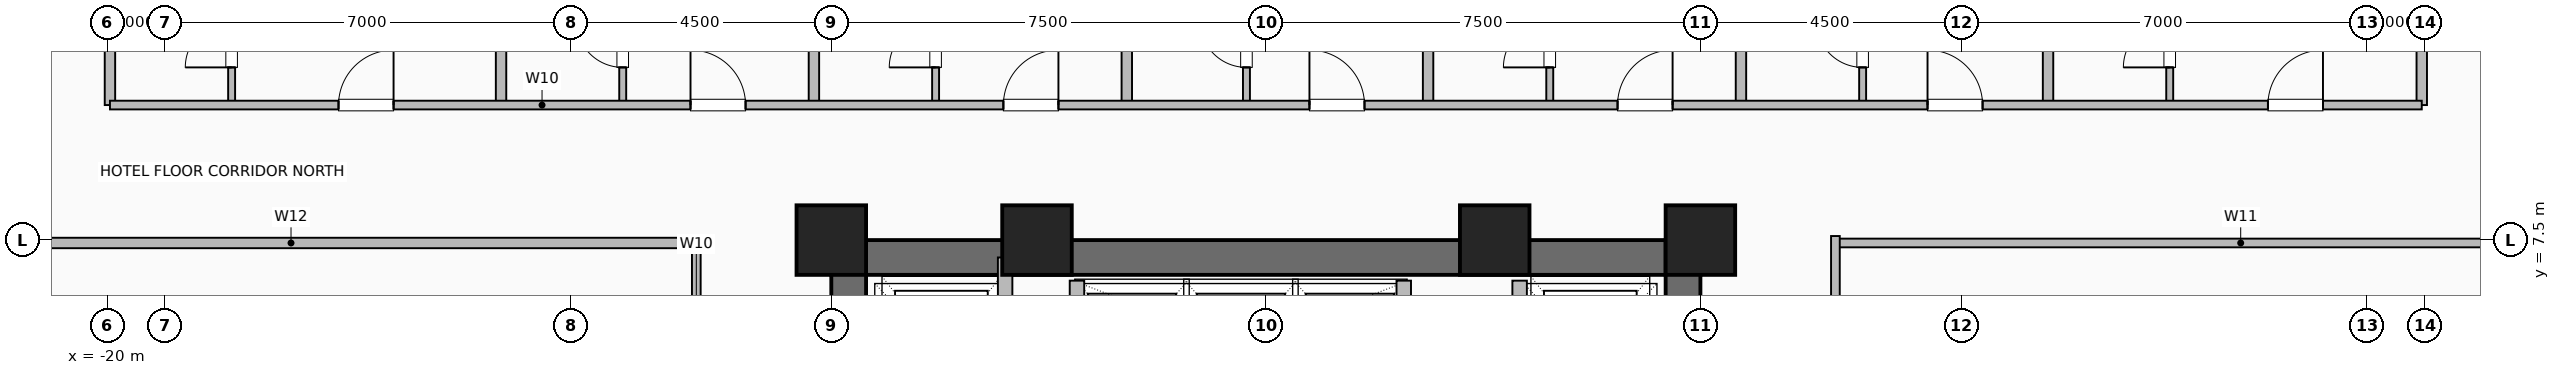
"""IFC4 building model, lengths in metres.
Left out: names, types, materials, properties, quantities, classifications, styles, units other than length and angle.
Written with IfcOpenShell. Run it as: python <this file> out.ifc"""

import sys

from ifc_helpers import new_model, si_unit, direction, frame, frame_2d, origin, origin_2d, place, context, subcontext, project, spatial, rectangle, hollow_rectangle, extrude, element, fill, save


model = new_model("IFC4")
c1 = context("Model", 3, precision=1e-05, world=origin(), true_north=direction((0.0, 1.0)))
c2 = subcontext(c1, "Body", "Model", "MODEL_VIEW")
j1 = project(units=[si_unit("LENGTHUNIT", "METRE"), si_unit("PLANEANGLEUNIT", "RADIAN")], contexts=[c1])
p1 = place(None, origin())
s1 = spatial("IfcSite", under=j1, at=p1, CompositionType="ELEMENT")
p2 = place(p1, origin())
s2 = spatial("IfcBuilding", under=s1, at=p2, CompositionType="ELEMENT")
p3 = place(p2, frame((0.0, 0.0, 34.0)))
s3 = spatial("IfcBuildingStorey", under=s2, at=p3, CompositionType="ELEMENT", Elevation=34.0)
for number, where, z_axis, x_axis in (
    (1, (7.5, 7.5, 0.0), (0.0, 0.0, 1.0), (1.0, 0.0, 0.0)),
    (2, (3.95, 7.5, 0.0), (0.0, 0.0, 1.0), (1.0, 0.0, 0.0)),
    (3, (-3.95, 7.5, 0.0), (0.0, 0.0, 1.0), (1.0, 0.0, 0.0)),
    (4, (-7.5, 7.5, 0.0), (0.0, 0.0, 1.0), (1.0, 0.0, 0.0)),
):
    element("IfcColumn", number, at=place(p3, frame(where, z_axis=z_axis, x_axis=x_axis)), inside=s3, PredefinedType="COLUMN", context=c2, shape_type="SweptSolid", body=[
        extrude(hollow_rectangle(XDim=1.2, YDim=1.2, WallThickness=0.055, at=origin_2d()), origin(), (0.0, 0.0, 1.0), 3.5),
    ])
p4 = place(p3, frame((-7.5, 7.2, 0.0), z_axis=(0.0, 0.0, 1.0), x_axis=(1.0, 0.0, 0.0)))
e5 = element("IfcWall", 5, at=p4, inside=s3, PredefinedType="SHEAR", context=c2, shape_type="SweptSolid", body=[
    extrude(rectangle(XDim=15.0, YDim=0.6, at=frame_2d((7.5, 0.0))), origin(), (0.0, 0.0, 1.0), 3.25),
])
p5 = place(p3, frame((-7.2, -7.5, 0.0), z_axis=(0.0, 0.0, 1.0), x_axis=(0.0, 1.0, 0.0)))
e6 = element("IfcWall", 6, at=p5, inside=s3, PredefinedType="SHEAR", context=c2, shape_type="SweptSolid", body=[
    extrude(rectangle(XDim=15.0, YDim=0.6, at=frame_2d((7.5, 0.0))), origin(), (0.0, 0.0, 1.0), 3.25),
])
p6 = place(p5, frame((9.5, 0.0, 0.0)))
e7 = element("IfcOpeningElement", 7, at=p6, cuts=e6, PredefinedType="OPENING", context=c2, shape_type="SweptSolid", body=[
    extrude(rectangle(XDim=1.0, YDim=2.08, at=frame_2d((0.5, 1.04))), frame((0.0, 0.31, 0.0), z_axis=(0.0, -1.0, 0.0), x_axis=(1.0, 0.0, 0.0)), (0.0, 0.0, 1.0), 0.62),
])
p7 = place(p3, frame((7.2, -7.5, 0.0), z_axis=(0.0, 0.0, 1.0), x_axis=(0.0, 1.0, 0.0)))
e8 = element("IfcWall", 8, at=p7, inside=s3, PredefinedType="SHEAR", context=c2, shape_type="SweptSolid", body=[
    extrude(rectangle(XDim=15.0, YDim=0.6, at=frame_2d((7.5, 0.0))), origin(), (0.0, 0.0, 1.0), 3.25),
])
for number, where, z_axis, x_axis in (
    (9, (-3.26, 4.58, 0.0), (0.0, 0.0, 1.0), (0.0, 1.0, 0.0)),
    (10, (2.38, 4.58, 0.0), (0.0, 0.0, 1.0), (0.0, 1.0, 0.0)),
):
    element("IfcWall", number, at=place(p3, frame(where, z_axis=z_axis, x_axis=x_axis)), inside=s3, PredefinedType="SHEAR", context=c2, shape_type="SweptSolid", body=[
        extrude(rectangle(XDim=2.22, YDim=0.25, at=frame_2d((1.11, 0.0))), origin(), (0.0, 0.0, 1.0), 3.25),
    ])
p8 = place(p3, frame((-4.5, 4.35, 0.0), z_axis=(0.0, 0.0, 1.0), x_axis=(0.0, 1.0, 0.0)))
e11 = element("IfcWall", 11, at=p8, inside=s3, PredefinedType="SHEAR", context=c2, shape_type="SweptSolid", body=[
    extrude(rectangle(XDim=2.85, YDim=0.25, at=frame_2d((1.425, 0.0))), origin(), (0.0, 0.0, 1.0), 3.25),
])
p9 = place(p3, frame((4.38, 4.3, 0.0), z_axis=(0.0, 0.0, 1.0), x_axis=(0.0, 1.0, 0.0)))
e12 = element("IfcWall", 12, at=p9, inside=s3, PredefinedType="SHEAR", context=c2, shape_type="SweptSolid", body=[
    extrude(rectangle(XDim=2.5, YDim=0.25, at=frame_2d((1.25, 0.0))), origin(), (0.0, 0.0, 1.0), 3.25),
])
p10 = place(p9, frame((0.8, 0.0, 0.0)))
e13 = element("IfcOpeningElement", 13, at=p10, cuts=e12, PredefinedType="OPENING", context=c2, shape_type="SweptSolid", body=[
    extrude(rectangle(XDim=1.2, YDim=2.2, at=frame_2d((0.6, 1.1))), frame((0.0, 0.135, 0.0), z_axis=(0.0, -1.0, 0.0), x_axis=(1.0, 0.0, 0.0)), (0.0, 0.0, 1.0), 0.27),
])
p11 = place(p3, frame((-17.85, 9.83, 0.0), z_axis=(0.0, 0.0, 1.0), x_axis=(0.0, 1.0, 0.0)))
e14 = element("IfcWall", 14, at=p11, inside=s3, PredefinedType="PLUMBINGWALL", context=c2, shape_type="SweptSolid", body=[
    extrude(rectangle(XDim=2.25, YDim=0.12, at=frame_2d((1.125, 0.0))), origin(), (0.0, 0.0, 1.0), 3.25),
])
p12 = place(p11, frame((0.65, 0.0, 0.0)))
e15 = element("IfcOpeningElement", 15, at=p12, cuts=e14, PredefinedType="OPENING", context=c2, shape_type="SweptSolid", body=[
    extrude(rectangle(XDim=0.8, YDim=2.05, at=frame_2d((0.4, 1.025))), frame((0.0, 0.07, 0.0), z_axis=(0.0, -1.0, 0.0), x_axis=(1.0, 0.0, 0.0)), (0.0, 0.0, 1.0), 0.14),
])
p13 = place(p3, frame((-11.1, 9.83, 0.0), z_axis=(0.0, 0.0, 1.0), x_axis=(0.0, 1.0, 0.0)))
e16 = element("IfcWall", 16, at=p13, inside=s3, PredefinedType="PLUMBINGWALL", context=c2, shape_type="SweptSolid", body=[
    extrude(rectangle(XDim=2.25, YDim=0.12, at=frame_2d((1.125, 0.0))), origin(), (0.0, 0.0, 1.0), 3.25),
])
p14 = place(p13, frame((0.65, 0.0, 0.0)))
e17 = element("IfcOpeningElement", 17, at=p14, cuts=e16, PredefinedType="OPENING", context=c2, shape_type="SweptSolid", body=[
    extrude(rectangle(XDim=0.8, YDim=2.05, at=frame_2d((0.4, 1.025))), frame((0.0, 0.07, 0.0), z_axis=(0.0, -1.0, 0.0), x_axis=(1.0, 0.0, 0.0)), (0.0, 0.0, 1.0), 0.14),
])
p15 = place(p3, frame((-5.7, 9.83, 0.0), z_axis=(0.0, 0.0, 1.0), x_axis=(0.0, 1.0, 0.0)))
e18 = element("IfcWall", 18, at=p15, inside=s3, PredefinedType="PLUMBINGWALL", context=c2, shape_type="SweptSolid", body=[
    extrude(rectangle(XDim=2.25, YDim=0.12, at=frame_2d((1.125, 0.0))), origin(), (0.0, 0.0, 1.0), 3.25),
])
p16 = place(p15, frame((0.65, 0.0, 0.0)))
e19 = element("IfcOpeningElement", 19, at=p16, cuts=e18, PredefinedType="OPENING", context=c2, shape_type="SweptSolid", body=[
    extrude(rectangle(XDim=0.8, YDim=2.05, at=frame_2d((0.4, 1.025))), frame((0.0, 0.07, 0.0), z_axis=(0.0, -1.0, 0.0), x_axis=(1.0, 0.0, 0.0)), (0.0, 0.0, 1.0), 0.14),
])
p17 = place(p3, frame((-0.335, 9.83, 0.0), z_axis=(0.0, 0.0, 1.0), x_axis=(0.0, 1.0, 0.0)))
e20 = element("IfcWall", 20, at=p17, inside=s3, PredefinedType="PLUMBINGWALL", context=c2, shape_type="SweptSolid", body=[
    extrude(rectangle(XDim=2.25, YDim=0.12, at=frame_2d((1.125, 0.0))), origin(), (0.0, 0.0, 1.0), 3.25),
])
p18 = place(p17, frame((0.65, 0.0, 0.0)))
e21 = element("IfcOpeningElement", 21, at=p18, cuts=e20, PredefinedType="OPENING", context=c2, shape_type="SweptSolid", body=[
    extrude(rectangle(XDim=0.8, YDim=2.05, at=frame_2d((0.4, 1.025))), frame((0.0, 0.07, 0.0), z_axis=(0.0, -1.0, 0.0), x_axis=(1.0, 0.0, 0.0)), (0.0, 0.0, 1.0), 0.14),
])
p19 = place(p3, frame((4.9, 9.83, 0.0), z_axis=(0.0, 0.0, 1.0), x_axis=(0.0, 1.0, 0.0)))
e22 = element("IfcWall", 22, at=p19, inside=s3, PredefinedType="PLUMBINGWALL", context=c2, shape_type="SweptSolid", body=[
    extrude(rectangle(XDim=2.25, YDim=0.12, at=frame_2d((1.125, 0.0))), origin(), (0.0, 0.0, 1.0), 3.25),
])
p20 = place(p19, frame((0.65, 0.0, 0.0)))
e23 = element("IfcOpeningElement", 23, at=p20, cuts=e22, PredefinedType="OPENING", context=c2, shape_type="SweptSolid", body=[
    extrude(rectangle(XDim=0.8, YDim=2.05, at=frame_2d((0.4, 1.025))), frame((0.0, 0.07, 0.0), z_axis=(0.0, -1.0, 0.0), x_axis=(1.0, 0.0, 0.0)), (0.0, 0.0, 1.0), 0.14),
])
p21 = place(p3, frame((10.3, 9.83, 0.0), z_axis=(0.0, 0.0, 1.0), x_axis=(0.0, 1.0, 0.0)))
e24 = element("IfcWall", 24, at=p21, inside=s3, PredefinedType="PLUMBINGWALL", context=c2, shape_type="SweptSolid", body=[
    extrude(rectangle(XDim=2.25, YDim=0.12, at=frame_2d((1.125, 0.0))), origin(), (0.0, 0.0, 1.0), 3.25),
])
p22 = place(p21, frame((0.65, 0.0, 0.0)))
e25 = element("IfcOpeningElement", 25, at=p22, cuts=e24, PredefinedType="OPENING", context=c2, shape_type="SweptSolid", body=[
    extrude(rectangle(XDim=0.8, YDim=2.05, at=frame_2d((0.4, 1.025))), frame((0.0, 0.07, 0.0), z_axis=(0.0, -1.0, 0.0), x_axis=(1.0, 0.0, 0.0)), (0.0, 0.0, 1.0), 0.14),
])
p23 = place(p3, frame((15.6, 9.83, 0.0), z_axis=(0.0, 0.0, 1.0), x_axis=(0.0, 1.0, 0.0)))
e26 = element("IfcWall", 26, at=p23, inside=s3, PredefinedType="PLUMBINGWALL", context=c2, shape_type="SweptSolid", body=[
    extrude(rectangle(XDim=2.25, YDim=0.12, at=frame_2d((1.125, 0.0))), origin(), (0.0, 0.0, 1.0), 3.25),
])
p24 = place(p23, frame((0.65, 0.0, 0.0)))
e27 = element("IfcOpeningElement", 27, at=p24, cuts=e26, PredefinedType="OPENING", context=c2, shape_type="SweptSolid", body=[
    extrude(rectangle(XDim=0.8, YDim=2.05, at=frame_2d((0.4, 1.025))), frame((0.0, 0.07, 0.0), z_axis=(0.0, -1.0, 0.0), x_axis=(1.0, 0.0, 0.0)), (0.0, 0.0, 1.0), 0.14),
])
for number, where, z_axis, x_axis in (
    (28, (-19.95, 9.83, 0.0), (0.0, 0.0, 1.0), (0.0, 1.0, 0.0)),
    (29, (-13.2, 9.83, 0.0), (0.0, 0.0, 1.0), (0.0, 1.0, 0.0)),
    (30, (-7.8, 9.83, 0.0), (0.0, 0.0, 1.0), (0.0, 1.0, 0.0)),
    (31, (-2.4, 9.83, 0.0), (0.0, 0.0, 1.0), (0.0, 1.0, 0.0)),
    (32, (2.8, 9.83, 0.0), (0.0, 0.0, 1.0), (0.0, 1.0, 0.0)),
    (33, (8.2, 9.83, 0.0), (0.0, 0.0, 1.0), (0.0, 1.0, 0.0)),
    (34, (13.5, 9.83, 0.0), (0.0, 0.0, 1.0), (0.0, 1.0, 0.0)),
    (35, (19.95, 9.83, 0.0), (0.0, 0.0, 1.0), (0.0, 1.0, 0.0)),
):
    element("IfcWall", number, at=place(p3, frame(where, z_axis=z_axis, x_axis=x_axis)), inside=s3, PredefinedType="PARTITIONING", context=c2, shape_type="SweptSolid", body=[
        extrude(rectangle(XDim=13.99, YDim=0.18, at=frame_2d((6.995, 0.0))), origin(), (0.0, 0.0, 1.0), 3.25),
    ])
p25 = place(p3, frame((-19.95, 9.83, 0.0), z_axis=(0.0, 0.0, 1.0), x_axis=(1.0, 0.0, 0.0)))
e36 = element("IfcWall", 36, at=p25, inside=s3, PredefinedType="PARTITIONING", context=c2, shape_type="SweptSolid", body=[
    extrude(rectangle(XDim=39.9, YDim=0.15, at=frame_2d((19.95, 0.0))), origin(), (0.0, 0.0, 1.0), 3.25),
])
p26 = place(p25, frame((3.945, 0.0, 0.0)))
e37 = element("IfcOpeningElement", 37, at=p26, cuts=e36, PredefinedType="OPENING", context=c2, shape_type="SweptSolid", body=[
    extrude(rectangle(XDim=0.95, YDim=2.08, at=frame_2d((0.475, 1.04))), frame((0.0, 0.085, 0.0), z_axis=(0.0, -1.0, 0.0), x_axis=(1.0, 0.0, 0.0)), (0.0, 0.0, 1.0), 0.17),
])
p27 = place(p25, frame((10.02, 0.0, 0.0)))
e38 = element("IfcOpeningElement", 38, at=p27, cuts=e36, PredefinedType="OPENING", context=c2, shape_type="SweptSolid", body=[
    extrude(rectangle(XDim=0.95, YDim=2.08, at=frame_2d((0.475, 1.04))), frame((0.0, 0.085, 0.0), z_axis=(0.0, -1.0, 0.0), x_axis=(1.0, 0.0, 0.0)), (0.0, 0.0, 1.0), 0.17),
])
p28 = place(p25, frame((15.42, 0.0, 0.0)))
e39 = element("IfcOpeningElement", 39, at=p28, cuts=e36, PredefinedType="OPENING", context=c2, shape_type="SweptSolid", body=[
    extrude(rectangle(XDim=0.95, YDim=2.08, at=frame_2d((0.475, 1.04))), frame((0.0, 0.085, 0.0), z_axis=(0.0, -1.0, 0.0), x_axis=(1.0, 0.0, 0.0)), (0.0, 0.0, 1.0), 0.17),
])
p29 = place(p25, frame((20.702, 0.0, 0.0)))
e40 = element("IfcOpeningElement", 40, at=p29, cuts=e36, PredefinedType="OPENING", context=c2, shape_type="SweptSolid", body=[
    extrude(rectangle(XDim=0.95, YDim=2.08, at=frame_2d((0.475, 1.04))), frame((0.0, 0.085, 0.0), z_axis=(0.0, -1.0, 0.0), x_axis=(1.0, 0.0, 0.0)), (0.0, 0.0, 1.0), 0.17),
])
p30 = place(p25, frame((26.02, 0.0, 0.0)))
e41 = element("IfcOpeningElement", 41, at=p30, cuts=e36, PredefinedType="OPENING", context=c2, shape_type="SweptSolid", body=[
    extrude(rectangle(XDim=0.95, YDim=2.08, at=frame_2d((0.475, 1.04))), frame((0.0, 0.085, 0.0), z_axis=(0.0, -1.0, 0.0), x_axis=(1.0, 0.0, 0.0)), (0.0, 0.0, 1.0), 0.17),
])
p31 = place(p25, frame((31.37, 0.0, 0.0)))
e42 = element("IfcOpeningElement", 42, at=p31, cuts=e36, PredefinedType="OPENING", context=c2, shape_type="SweptSolid", body=[
    extrude(rectangle(XDim=0.95, YDim=2.08, at=frame_2d((0.475, 1.04))), frame((0.0, 0.085, 0.0), z_axis=(0.0, -1.0, 0.0), x_axis=(1.0, 0.0, 0.0)), (0.0, 0.0, 1.0), 0.17),
])
p32 = place(p25, frame((37.245, 0.0, 0.0)))
e43 = element("IfcOpeningElement", 43, at=p32, cuts=e36, PredefinedType="OPENING", context=c2, shape_type="SweptSolid", body=[
    extrude(rectangle(XDim=0.95, YDim=2.08, at=frame_2d((0.475, 1.04))), frame((0.0, 0.085, 0.0), z_axis=(0.0, -1.0, 0.0), x_axis=(1.0, 0.0, 0.0)), (0.0, 0.0, 1.0), 0.17),
])
p33 = place(p3, frame((-23.82, 7.45, 0.0), z_axis=(0.0, 0.0, 1.0), x_axis=(1.0, 0.0, 0.0)))
e44 = element("IfcWall", 44, at=p33, inside=s3, PredefinedType="PARTITIONING", context=c2, shape_type="SweptSolid", body=[
    extrude(rectangle(XDim=13.99, YDim=0.18, at=frame_2d((6.995, 0.0))), origin(), (0.0, 0.0, 1.0), 3.25),
])
p34 = place(p3, frame((-9.83, -7.45, 0.0), z_axis=(0.0, 0.0, 1.0), x_axis=(0.0, 1.0, 0.0)))
e45 = element("IfcWall", 45, at=p34, inside=s3, PredefinedType="PARTITIONING", context=c2, shape_type="SweptSolid", body=[
    extrude(rectangle(XDim=14.9, YDim=0.15, at=frame_2d((7.45, 0.0))), origin(), (0.0, 0.0, 1.0), 3.25),
])
p35 = place(p34, frame((3.049, 0.0, 0.0)))
e46 = element("IfcOpeningElement", 46, at=p35, cuts=e45, PredefinedType="OPENING", context=c2, shape_type="SweptSolid", body=[
    extrude(rectangle(XDim=0.95, YDim=2.08, at=frame_2d((0.475, 1.04))), frame((0.0, 0.085, 0.0), z_axis=(0.0, -1.0, 0.0), x_axis=(1.0, 0.0, 0.0)), (0.0, 0.0, 1.0), 0.17),
])
p36 = place(p34, frame((7.927, 0.0, 0.0)))
e47 = element("IfcOpeningElement", 47, at=p36, cuts=e45, PredefinedType="OPENING", context=c2, shape_type="SweptSolid", body=[
    extrude(rectangle(XDim=0.95, YDim=2.08, at=frame_2d((0.475, 1.04))), frame((0.0, 0.085, 0.0), z_axis=(0.0, -1.0, 0.0), x_axis=(1.0, 0.0, 0.0)), (0.0, 0.0, 1.0), 0.17),
])
p37 = place(p34, frame((12.899, 0.0, 0.0)))
e48 = element("IfcOpeningElement", 48, at=p37, cuts=e45, PredefinedType="OPENING", context=c2, shape_type="SweptSolid", body=[
    extrude(rectangle(XDim=0.95, YDim=2.08, at=frame_2d((0.475, 1.04))), frame((0.0, 0.085, 0.0), z_axis=(0.0, -1.0, 0.0), x_axis=(1.0, 0.0, 0.0)), (0.0, 0.0, 1.0), 0.17),
])
p38 = place(p3, frame((9.83, 7.45, 0.0), z_axis=(0.0, 0.0, 1.0), x_axis=(1.0, 0.0, 0.0)))
e49 = element("IfcWall", 49, at=p38, inside=s3, PredefinedType="PARTITIONING", context=c2, shape_type="SweptSolid", body=[
    extrude(rectangle(XDim=13.99, YDim=0.15, at=frame_2d((6.995, 0.0))), origin(), (0.0, 0.0, 1.0), 3.25),
])
p39 = place(p3, frame((9.83, -7.57, 0.0), z_axis=(0.0, 0.0, 1.0), x_axis=(0.0, 1.0, 0.0)))
e50 = element("IfcWall", 50, at=p39, inside=s3, PredefinedType="PARTITIONING", context=c2, shape_type="SweptSolid", body=[
    extrude(rectangle(XDim=15.14, YDim=0.15, at=frame_2d((7.57, 0.0))), origin(), (0.0, 0.0, 1.0), 3.25),
])
p40 = place(p39, frame((1.62, 0.0, 0.0)))
e51 = element("IfcOpeningElement", 51, at=p40, cuts=e50, PredefinedType="OPENING", context=c2, shape_type="SweptSolid", body=[
    extrude(rectangle(XDim=0.95, YDim=2.06, at=frame_2d((0.475, 1.03))), frame((0.0, 0.085, 0.0), z_axis=(0.0, -1.0, 0.0), x_axis=(1.0, 0.0, 0.0)), (0.0, 0.0, 1.0), 0.17),
])
p41 = place(p39, frame((4.645, 0.0, 0.0)))
e52 = element("IfcOpeningElement", 52, at=p41, cuts=e50, PredefinedType="OPENING", context=c2, shape_type="SweptSolid", body=[
    extrude(rectangle(XDim=0.85, YDim=2.05, at=frame_2d((0.425, 1.025))), frame((0.0, 0.085, 0.0), z_axis=(0.0, -1.0, 0.0), x_axis=(1.0, 0.0, 0.0)), (0.0, 0.0, 1.0), 0.17),
])
p42 = place(p39, frame((7.745, 0.0, 0.0)))
e53 = element("IfcOpeningElement", 53, at=p42, cuts=e50, PredefinedType="OPENING", context=c2, shape_type="SweptSolid", body=[
    extrude(rectangle(XDim=0.95, YDim=2.06, at=frame_2d((0.475, 1.03))), frame((0.0, 0.085, 0.0), z_axis=(0.0, -1.0, 0.0), x_axis=(1.0, 0.0, 0.0)), (0.0, 0.0, 1.0), 0.17),
])
p43 = place(p39, frame((12.22, 0.0, 0.0)))
e54 = element("IfcOpeningElement", 54, at=p43, cuts=e50, PredefinedType="OPENING", context=c2, shape_type="SweptSolid", body=[
    extrude(rectangle(XDim=0.95, YDim=2.06, at=frame_2d((0.475, 1.03))), frame((0.0, 0.085, 0.0), z_axis=(0.0, -1.0, 0.0), x_axis=(1.0, 0.0, 0.0)), (0.0, 0.0, 1.0), 0.17),
])
p44 = place(p12, origin())
e55 = element("IfcDoor", 55, at=p44, inside=s3, OperationType="SINGLE_SWING_LEFT", PredefinedType="DOOR", context=c2, shape_type="SweptSolid", body=[
    extrude(rectangle(XDim=0.8, YDim=2.05, at=frame_2d((0.4, 1.025))), frame((0.0, 0.025, 0.0), z_axis=(0.0, -1.0, 0.0), x_axis=(1.0, 0.0, 0.0)), (0.0, 0.0, 1.0), 0.05),
])
fill(e15, e55)
p45 = place(p14, origin())
e56 = element("IfcDoor", 56, at=p45, inside=s3, OperationType="SINGLE_SWING_RIGHT", PredefinedType="DOOR", context=c2, shape_type="SweptSolid", body=[
    extrude(rectangle(XDim=0.8, YDim=2.05, at=frame_2d((0.4, 1.025))), frame((0.0, 0.025, 0.0), z_axis=(0.0, -1.0, 0.0), x_axis=(1.0, 0.0, 0.0)), (0.0, 0.0, 1.0), 0.05),
])
fill(e17, e56)
p46 = place(p16, origin())
e57 = element("IfcDoor", 57, at=p46, inside=s3, OperationType="SINGLE_SWING_LEFT", PredefinedType="DOOR", context=c2, shape_type="SweptSolid", body=[
    extrude(rectangle(XDim=0.8, YDim=2.05, at=frame_2d((0.4, 1.025))), frame((0.0, 0.025, 0.0), z_axis=(0.0, -1.0, 0.0), x_axis=(1.0, 0.0, 0.0)), (0.0, 0.0, 1.0), 0.05),
])
fill(e19, e57)
p47 = place(p18, origin())
e58 = element("IfcDoor", 58, at=p47, inside=s3, OperationType="SINGLE_SWING_RIGHT", PredefinedType="DOOR", context=c2, shape_type="SweptSolid", body=[
    extrude(rectangle(XDim=0.8, YDim=2.05, at=frame_2d((0.4, 1.025))), frame((0.0, 0.025, 0.0), z_axis=(0.0, -1.0, 0.0), x_axis=(1.0, 0.0, 0.0)), (0.0, 0.0, 1.0), 0.05),
])
fill(e21, e58)
p48 = place(p20, origin())
e59 = element("IfcDoor", 59, at=p48, inside=s3, OperationType="SINGLE_SWING_LEFT", PredefinedType="DOOR", context=c2, shape_type="SweptSolid", body=[
    extrude(rectangle(XDim=0.8, YDim=2.05, at=frame_2d((0.4, 1.025))), frame((0.0, 0.025, 0.0), z_axis=(0.0, -1.0, 0.0), x_axis=(1.0, 0.0, 0.0)), (0.0, 0.0, 1.0), 0.05),
])
fill(e23, e59)
p49 = place(p22, origin())
e60 = element("IfcDoor", 60, at=p49, inside=s3, OperationType="SINGLE_SWING_RIGHT", PredefinedType="DOOR", context=c2, shape_type="SweptSolid", body=[
    extrude(rectangle(XDim=0.8, YDim=2.05, at=frame_2d((0.4, 1.025))), frame((0.0, 0.025, 0.0), z_axis=(0.0, -1.0, 0.0), x_axis=(1.0, 0.0, 0.0)), (0.0, 0.0, 1.0), 0.05),
])
fill(e25, e60)
p50 = place(p24, origin())
e61 = element("IfcDoor", 61, at=p50, inside=s3, OperationType="SINGLE_SWING_LEFT", PredefinedType="DOOR", context=c2, shape_type="SweptSolid", body=[
    extrude(rectangle(XDim=0.8, YDim=2.05, at=frame_2d((0.4, 1.025))), frame((0.0, 0.025, 0.0), z_axis=(0.0, -1.0, 0.0), x_axis=(1.0, 0.0, 0.0)), (0.0, 0.0, 1.0), 0.05),
])
fill(e27, e61)
p51 = place(p26, origin())
e62 = element("IfcDoor", 62, at=p51, inside=s3, OperationType="SINGLE_SWING_RIGHT", PredefinedType="DOOR", context=c2, shape_type="SweptSolid", body=[
    extrude(rectangle(XDim=0.95, YDim=2.08, at=frame_2d((0.475, 1.04))), frame((0.0, 0.025, 0.0), z_axis=(0.0, -1.0, 0.0), x_axis=(1.0, 0.0, 0.0)), (0.0, 0.0, 1.0), 0.05),
])
fill(e37, e62)
p52 = place(p27, origin())
e63 = element("IfcDoor", 63, at=p52, inside=s3, OperationType="SINGLE_SWING_LEFT", PredefinedType="DOOR", context=c2, shape_type="SweptSolid", body=[
    extrude(rectangle(XDim=0.95, YDim=2.08, at=frame_2d((0.475, 1.04))), frame((0.0, 0.025, 0.0), z_axis=(0.0, -1.0, 0.0), x_axis=(1.0, 0.0, 0.0)), (0.0, 0.0, 1.0), 0.05),
])
fill(e38, e63)
p53 = place(p28, origin())
e64 = element("IfcDoor", 64, at=p53, inside=s3, OperationType="SINGLE_SWING_RIGHT", PredefinedType="DOOR", context=c2, shape_type="SweptSolid", body=[
    extrude(rectangle(XDim=0.95, YDim=2.08, at=frame_2d((0.475, 1.04))), frame((0.0, 0.025, 0.0), z_axis=(0.0, -1.0, 0.0), x_axis=(1.0, 0.0, 0.0)), (0.0, 0.0, 1.0), 0.05),
])
fill(e39, e64)
p54 = place(p29, origin())
e65 = element("IfcDoor", 65, at=p54, inside=s3, OperationType="SINGLE_SWING_LEFT", PredefinedType="DOOR", context=c2, shape_type="SweptSolid", body=[
    extrude(rectangle(XDim=0.95, YDim=2.08, at=frame_2d((0.475, 1.04))), frame((0.0, 0.025, 0.0), z_axis=(0.0, -1.0, 0.0), x_axis=(1.0, 0.0, 0.0)), (0.0, 0.0, 1.0), 0.05),
])
fill(e40, e65)
p55 = place(p30, origin())
e66 = element("IfcDoor", 66, at=p55, inside=s3, OperationType="SINGLE_SWING_RIGHT", PredefinedType="DOOR", context=c2, shape_type="SweptSolid", body=[
    extrude(rectangle(XDim=0.95, YDim=2.08, at=frame_2d((0.475, 1.04))), frame((0.0, 0.025, 0.0), z_axis=(0.0, -1.0, 0.0), x_axis=(1.0, 0.0, 0.0)), (0.0, 0.0, 1.0), 0.05),
])
fill(e41, e66)
p56 = place(p31, origin())
e67 = element("IfcDoor", 67, at=p56, inside=s3, OperationType="SINGLE_SWING_LEFT", PredefinedType="DOOR", context=c2, shape_type="SweptSolid", body=[
    extrude(rectangle(XDim=0.95, YDim=2.08, at=frame_2d((0.475, 1.04))), frame((0.0, 0.025, 0.0), z_axis=(0.0, -1.0, 0.0), x_axis=(1.0, 0.0, 0.0)), (0.0, 0.0, 1.0), 0.05),
])
fill(e42, e67)
p57 = place(p32, origin())
e68 = element("IfcDoor", 68, at=p57, inside=s3, OperationType="SINGLE_SWING_RIGHT", PredefinedType="DOOR", context=c2, shape_type="SweptSolid", body=[
    extrude(rectangle(XDim=0.95, YDim=2.08, at=frame_2d((0.475, 1.04))), frame((0.0, 0.025, 0.0), z_axis=(0.0, -1.0, 0.0), x_axis=(1.0, 0.0, 0.0)), (0.0, 0.0, 1.0), 0.05),
])
fill(e43, e68)
save(model, sys.argv[1])
